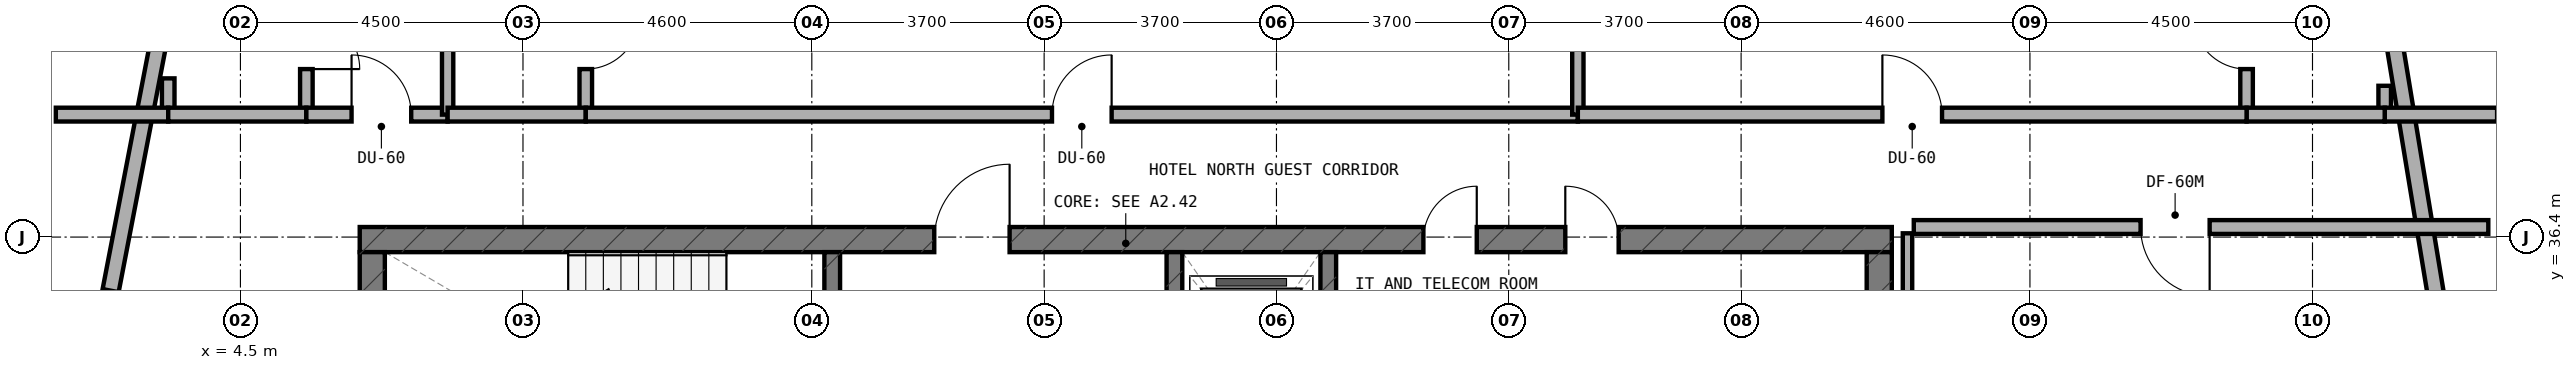
"""IFC4 building model, lengths in metres.
Left out: names, types, materials, properties, quantities, classifications, styles, units other than length and angle.
Written with IfcOpenShell. Run it as: python <this file> out.ifc"""

import sys

from ifc_helpers import new_model, si_unit, direction, frame, frame_2d, origin, place, context, subcontext, project, spatial, rectangle, extrude, element, fill, save


model = new_model("IFC4")
c1 = context("Model", 3, precision=1e-05, world=origin(), true_north=direction((0.0, 1.0)))
c2 = subcontext(c1, "Body", "Model", "MODEL_VIEW")
j1 = project(units=[si_unit("LENGTHUNIT", "METRE"), si_unit("PLANEANGLEUNIT", "RADIAN")], contexts=[c1])
p1 = place(None, origin())
s1 = spatial("IfcSite", under=j1, at=p1, CompositionType="ELEMENT")
p2 = place(p1, origin())
s2 = spatial("IfcBuilding", under=s1, at=p2, CompositionType="ELEMENT")
p3 = place(p2, frame((0.0, 0.0, 195.5)))
s3 = spatial("IfcBuildingStorey", under=s2, at=p3, CompositionType="ELEMENT", Elevation=195.5)
p4 = place(p3, frame((6.4, 36.36, 0.0), z_axis=(0.0, 0.0, 1.0), x_axis=(1.0, 0.0, 0.0)))
e1 = element("IfcWall", 1, at=p4, inside=s3, PredefinedType="SHEAR", context=c2, shape_type="SweptSolid", body=[
    extrude(rectangle(XDim=24.4, YDim=0.4, at=frame_2d((12.2, 0.0))), origin(), (0.0, 0.0, 1.0), 3.6),
])
p5 = place(p4, frame((9.15, 0.0, 0.0)))
e2 = element("IfcOpeningElement", 2, at=p5, cuts=e1, PredefinedType="OPENING", context=c2, shape_type="SweptSolid", body=[
    extrude(rectangle(XDim=1.2, YDim=2.15, at=frame_2d((0.6, 1.075))), frame((0.0, 0.21, 0.0), z_axis=(0.0, -1.0, 0.0), x_axis=(1.0, 0.0, 0.0)), (0.0, 0.0, 1.0), 0.42),
])
p6 = place(p4, frame((19.2, 0.0, 0.0)))
e3 = element("IfcOpeningElement", 3, at=p6, cuts=e1, PredefinedType="OPENING", context=c2, shape_type="SweptSolid", body=[
    extrude(rectangle(XDim=0.85, YDim=2.1, at=frame_2d((0.425, 1.05))), frame((0.0, 0.21, 0.0), z_axis=(0.0, -1.0, 0.0), x_axis=(1.0, 0.0, 0.0)), (0.0, 0.0, 1.0), 0.42),
])
p7 = place(p4, frame((16.94, 0.0, 0.0)))
e4 = element("IfcOpeningElement", 4, at=p7, cuts=e1, PredefinedType="OPENING", context=c2, shape_type="SweptSolid", body=[
    extrude(rectangle(XDim=0.85, YDim=2.1, at=frame_2d((0.425, 1.05))), frame((0.0, 0.21, 0.0), z_axis=(0.0, -1.0, 0.0), x_axis=(1.0, 0.0, 0.0)), (0.0, 0.0, 1.0), 0.42),
])
for number, where, z_axis, x_axis in (
    (5, (6.6, 33.0, 0.0), (0.0, 0.0, 1.0), (0.0, 1.0, 0.0)),
    (6, (30.6, 33.0, 0.0), (0.0, 0.0, 1.0), (0.0, 1.0, 0.0)),
):
    element("IfcWall", number, at=place(p3, frame(where, z_axis=z_axis, x_axis=x_axis)), inside=s3, PredefinedType="SHEAR", context=c2, shape_type="SweptSolid", body=[
        extrude(rectangle(XDim=3.16, YDim=0.4, at=frame_2d((1.58, 0.0))), origin(), (0.0, 0.0, 1.0), 3.6),
    ])
p8 = place(p3, frame((13.925, 33.0, 0.0), z_axis=(0.0, 0.0, 1.0), x_axis=(0.0, 1.0, 0.0)))
e7 = element("IfcWall", 7, at=p8, inside=s3, PredefinedType="STANDARD", context=c2, shape_type="SweptSolid", body=[
    extrude(rectangle(XDim=3.16, YDim=0.25, at=frame_2d((1.58, 0.0))), origin(), (0.0, 0.0, 1.0), 3.28),
])
p9 = place(p8, frame((0.98, 0.0, 0.0)))
e8 = element("IfcOpeningElement", 8, at=p9, cuts=e7, PredefinedType="OPENING", context=c2, shape_type="SweptSolid", body=[
    extrude(rectangle(XDim=1.1, YDim=2.15, at=frame_2d((0.55, 1.075))), frame((0.0, 0.135, 0.0), z_axis=(0.0, -1.0, 0.0), x_axis=(1.0, 0.0, 0.0)), (0.0, 0.0, 1.0), 0.27),
])
p10 = place(p3, frame((19.375, 33.0, 0.0), z_axis=(0.0, 0.0, 1.0), x_axis=(0.0, 1.0, 0.0)))
e9 = element("IfcWall", 9, at=p10, inside=s3, PredefinedType="STANDARD", context=c2, shape_type="SweptSolid", body=[
    extrude(rectangle(XDim=3.16, YDim=0.25, at=frame_2d((1.58, 0.0))), origin(), (0.0, 0.0, 1.0), 3.28),
])
p11 = place(p10, frame((0.98, 0.0, 0.0)))
e10 = element("IfcOpeningElement", 10, at=p11, cuts=e9, PredefinedType="OPENING", context=c2, shape_type="SweptSolid", body=[
    extrude(rectangle(XDim=1.1, YDim=2.15, at=frame_2d((0.55, 1.075))), frame((0.0, 0.135, 0.0), z_axis=(0.0, -1.0, 0.0), x_axis=(1.0, 0.0, 0.0)), (0.0, 0.0, 1.0), 0.27),
])
p12 = place(p3, frame((21.825, 33.0, 0.0), z_axis=(0.0, 0.0, 1.0), x_axis=(0.0, 1.0, 0.0)))
e11 = element("IfcWall", 11, at=p12, inside=s3, PredefinedType="STANDARD", context=c2, shape_type="SweptSolid", body=[
    extrude(rectangle(XDim=3.16, YDim=0.25, at=frame_2d((1.58, 0.0))), origin(), (0.0, 0.0, 1.0), 3.28),
])
p13 = place(p3, frame((40.476, 29.354, 0.0), z_axis=(0.0, 0.0, 1.0), x_axis=(-0.162811037825, 0.986657268742, 0.0)))
e12 = element("IfcWall", 12, at=p13, inside=s3, PredefinedType="STANDARD", context=c2, shape_type="SweptSolid", body=[
    extrude(rectangle(XDim=10.473, YDim=0.26, at=frame_2d((5.236, 0.0))), origin(), (0.0, 0.0, 1.0), 3.28),
])
p14 = place(p13, frame((2.545, 0.0, 0.85)))
e13 = element("IfcOpeningElement", 13, at=p14, cuts=e12, PredefinedType="OPENING", context=c2, shape_type="SweptSolid", body=[
    extrude(rectangle(XDim=2.1, YDim=1.5, at=frame_2d((1.05, 0.75))), frame((0.0, 0.14, 0.0), z_axis=(0.0, -1.0, 0.0), x_axis=(1.0, 0.0, 0.0)), (0.0, 0.0, 1.0), 0.28),
])
p15 = place(p3, frame((3.23, 39.683, 0.0), z_axis=(0.0, 0.0, 1.0), x_axis=(-0.189254809039, -0.98192801022, 0.0)))
e14 = element("IfcWall", 14, at=p15, inside=s3, PredefinedType="STANDARD", context=c2, shape_type="SweptSolid", body=[
    extrude(rectangle(XDim=9.046, YDim=0.26, at=frame_2d((4.523, 0.0))), origin(), (0.0, 0.0, 1.0), 3.28),
])
p16 = place(p15, frame((4.212, 0.0, 0.85)))
e15 = element("IfcOpeningElement", 15, at=p16, cuts=e14, PredefinedType="OPENING", context=c2, shape_type="SweptSolid", body=[
    extrude(rectangle(XDim=2.1, YDim=1.5, at=frame_2d((1.05, 0.75))), frame((0.0, 0.14, 0.0), z_axis=(0.0, -1.0, 0.0), x_axis=(1.0, 0.0, 0.0)), (0.0, 0.0, 1.0), 0.28),
])
p17 = place(p3, frame((5.55, 38.45, 0.0), z_axis=(0.0, 0.0, 1.0), x_axis=(0.0, 1.0, 0.0)))
e16 = element("IfcWall", 16, at=p17, inside=s3, PredefinedType="PLUMBINGWALL", context=c2, shape_type="SweptSolid", body=[
    extrude(rectangle(XDim=2.1, YDim=0.2, at=frame_2d((1.05, 0.0))), origin(), (0.0, 0.0, 1.0), 3.28),
])
p18 = place(p17, frame((0.625, 0.0, 0.0)))
e17 = element("IfcOpeningElement", 17, at=p18, cuts=e16, PredefinedType="OPENING", context=c2, shape_type="SweptSolid", body=[
    extrude(rectangle(XDim=0.85, YDim=2.1, at=frame_2d((0.425, 1.05))), frame((0.0, 0.11, 0.0), z_axis=(0.0, -1.0, 0.0), x_axis=(1.0, 0.0, 0.0)), (0.0, 0.0, 1.0), 0.22),
])
p19 = place(p3, frame((3.35, 38.35, 0.0), z_axis=(0.0, 0.0, 1.0), x_axis=(0.0, 1.0, 0.0)))
e18 = element("IfcWall", 18, at=p19, inside=s3, PredefinedType="PLUMBINGWALL", context=c2, shape_type="SweptSolid", body=[
    extrude(rectangle(XDim=0.577, YDim=0.2, at=frame_2d((0.289, 0.0))), origin(), (0.0, 0.0, 1.0), 3.28),
])
p20 = place(p3, frame((1.56, 38.35, 0.0), z_axis=(0.0, 0.0, 1.0), x_axis=(1.0, 0.0, 0.0)))
e19 = element("IfcWall", 19, at=p20, inside=s3, PredefinedType="SOLIDWALL", context=c2, shape_type="SweptSolid", body=[
    extrude(rectangle(XDim=1.79, YDim=0.22, at=frame_2d((0.895, 0.0))), origin(), (0.0, 0.0, 1.0), 3.28),
])
p21 = place(p3, frame((3.35, 38.35, 0.0), z_axis=(0.0, 0.0, 1.0), x_axis=(1.0, 0.0, 0.0)))
e20 = element("IfcWall", 20, at=p21, inside=s3, PredefinedType="SOLIDWALL", context=c2, shape_type="SweptSolid", body=[
    extrude(rectangle(XDim=2.2, YDim=0.22, at=frame_2d((1.1, 0.0))), origin(), (0.0, 0.0, 1.0), 3.28),
])
p22 = place(p3, frame((5.55, 38.35, 0.0), z_axis=(0.0, 0.0, 1.0), x_axis=(1.0, 0.0, 0.0)))
e21 = element("IfcWall", 21, at=p22, inside=s3, PredefinedType="SOLIDWALL", context=c2, shape_type="SweptSolid", body=[
    extrude(rectangle(XDim=2.25, YDim=0.22, at=frame_2d((1.125, 0.0))), origin(), (0.0, 0.0, 1.0), 2.955),
])
p23 = place(p22, frame((0.72, 0.0, 0.0)))
e22 = element("IfcOpeningElement", 22, at=p23, cuts=e21, PredefinedType="OPENING", context=c2, shape_type="SweptSolid", body=[
    extrude(rectangle(XDim=0.95, YDim=2.1, at=frame_2d((0.475, 1.05))), frame((0.0, 0.12, 0.0), z_axis=(0.0, -1.0, 0.0), x_axis=(1.0, 0.0, 0.0)), (0.0, 0.0, 1.0), 0.24),
])
p24 = place(p3, frame((7.8, 38.35, 0.0), z_axis=(0.0, 0.0, 1.0), x_axis=(0.0, 1.0, 0.0)))
e23 = element("IfcWall", 23, at=p24, inside=s3, PredefinedType="SOLIDWALL", context=c2, shape_type="SweptSolid", body=[
    extrude(rectangle(XDim=4.778, YDim=0.18, at=frame_2d((2.389, 0.0))), origin(), (0.0, 0.0, 1.0), 2.895),
])
p25 = place(p3, frame((10.0, 38.45, 0.0), z_axis=(0.0, 0.0, 1.0), x_axis=(0.0, 1.0, 0.0)))
e24 = element("IfcWall", 24, at=p25, inside=s3, PredefinedType="PLUMBINGWALL", context=c2, shape_type="SweptSolid", body=[
    extrude(rectangle(XDim=2.1, YDim=0.2, at=frame_2d((1.05, 0.0))), origin(), (0.0, 0.0, 1.0), 2.895),
])
p26 = place(p25, frame((0.625, 0.0, 0.0)))
e25 = element("IfcOpeningElement", 25, at=p26, cuts=e24, PredefinedType="OPENING", context=c2, shape_type="SweptSolid", body=[
    extrude(rectangle(XDim=0.85, YDim=2.1, at=frame_2d((0.425, 1.05))), frame((0.0, 0.11, 0.0), z_axis=(0.0, -1.0, 0.0), x_axis=(1.0, 0.0, 0.0)), (0.0, 0.0, 1.0), 0.22),
])
p27 = place(p3, frame((7.8, 38.35, 0.0), z_axis=(0.0, 0.0, 1.0), x_axis=(1.0, 0.0, 0.0)))
e26 = element("IfcWall", 26, at=p27, inside=s3, PredefinedType="SOLIDWALL", context=c2, shape_type="SweptSolid", body=[
    extrude(rectangle(XDim=2.2, YDim=0.22, at=frame_2d((1.1, 0.0))), origin(), (0.0, 0.0, 1.0), 2.955),
])
p28 = place(p3, frame((10.0, 38.35, 0.0), z_axis=(0.0, 0.0, 1.0), x_axis=(1.0, 0.0, 0.0)))
e27 = element("IfcWall", 27, at=p28, inside=s3, PredefinedType="SOLIDWALL", context=c2, shape_type="SweptSolid", body=[
    extrude(rectangle(XDim=15.8, YDim=0.22, at=frame_2d((7.9, 0.0))), origin(), (0.0, 0.0, 1.0), 2.955),
])
p29 = place(p28, frame((7.425, 0.0, 0.0)))
e28 = element("IfcOpeningElement", 28, at=p29, cuts=e27, PredefinedType="OPENING", context=c2, shape_type="SweptSolid", body=[
    extrude(rectangle(XDim=0.95, YDim=2.1, at=frame_2d((0.475, 1.05))), frame((0.0, 0.12, 0.0), z_axis=(0.0, -1.0, 0.0), x_axis=(1.0, 0.0, 0.0)), (0.0, 0.0, 1.0), 0.24),
])
p30 = place(p3, frame((25.8, 38.35, 0.0), z_axis=(0.0, 0.0, 1.0), x_axis=(0.0, 1.0, 0.0)))
e29 = element("IfcWall", 29, at=p30, inside=s3, PredefinedType="SOLIDWALL", context=c2, shape_type="SweptSolid", body=[
    extrude(rectangle(XDim=6.19, YDim=0.18, at=frame_2d((3.095, 0.0))), origin(), (0.0, 0.0, 1.0), 2.895),
])
p31 = place(p3, frame((36.45, 38.45, 0.0), z_axis=(0.0, 0.0, 1.0), x_axis=(0.0, 1.0, 0.0)))
e30 = element("IfcWall", 30, at=p31, inside=s3, PredefinedType="PLUMBINGWALL", context=c2, shape_type="SweptSolid", body=[
    extrude(rectangle(XDim=2.1, YDim=0.2, at=frame_2d((1.05, 0.0))), origin(), (0.0, 0.0, 1.0), 3.28),
])
p32 = place(p31, frame((0.625, 0.0, 0.0)))
e31 = element("IfcOpeningElement", 31, at=p32, cuts=e30, PredefinedType="OPENING", context=c2, shape_type="SweptSolid", body=[
    extrude(rectangle(XDim=0.85, YDim=2.1, at=frame_2d((0.425, 1.05))), frame((0.0, 0.11, 0.0), z_axis=(0.0, -1.0, 0.0), x_axis=(1.0, 0.0, 0.0)), (0.0, 0.0, 1.0), 0.22),
])
p33 = place(p3, frame((38.65, 38.35, 0.0), z_axis=(0.0, 0.0, 1.0), x_axis=(0.0, 1.0, 0.0)))
e32 = element("IfcWall", 32, at=p33, inside=s3, PredefinedType="PLUMBINGWALL", context=c2, shape_type="SweptSolid", body=[
    extrude(rectangle(XDim=0.459, YDim=0.2, at=frame_2d((0.229, 0.0))), origin(), (0.0, 0.0, 1.0), 3.28),
])
p34 = place(p3, frame((38.65, 38.35, 0.0), z_axis=(0.0, 0.0, 1.0), x_axis=(1.0, 0.0, 0.0)))
e33 = element("IfcWall", 33, at=p34, inside=s3, PredefinedType="SOLIDWALL", context=c2, shape_type="SweptSolid", body=[
    extrude(rectangle(XDim=1.79, YDim=0.22, at=frame_2d((0.895, 0.0))), origin(), (0.0, 0.0, 1.0), 3.28),
])
p35 = place(p3, frame((36.45, 38.35, 0.0), z_axis=(0.0, 0.0, 1.0), x_axis=(1.0, 0.0, 0.0)))
e34 = element("IfcWall", 34, at=p35, inside=s3, PredefinedType="SOLIDWALL", context=c2, shape_type="SweptSolid", body=[
    extrude(rectangle(XDim=2.2, YDim=0.22, at=frame_2d((1.1, 0.0))), origin(), (0.0, 0.0, 1.0), 3.28),
])
p36 = place(p3, frame((25.8, 38.35, 0.0), z_axis=(0.0, 0.0, 1.0), x_axis=(1.0, 0.0, 0.0)))
e35 = element("IfcWall", 35, at=p36, inside=s3, PredefinedType="SOLIDWALL", context=c2, shape_type="SweptSolid", body=[
    extrude(rectangle(XDim=10.65, YDim=0.22, at=frame_2d((5.325, 0.0))), origin(), (0.0, 0.0, 1.0), 2.895),
])
p37 = place(p36, frame((4.85, 0.0, 0.0)))
e36 = element("IfcOpeningElement", 36, at=p37, cuts=e35, PredefinedType="OPENING", context=c2, shape_type="SweptSolid", body=[
    extrude(rectangle(XDim=0.95, YDim=2.1, at=frame_2d((0.475, 1.05))), frame((0.0, 0.12, 0.0), z_axis=(0.0, -1.0, 0.0), x_axis=(1.0, 0.0, 0.0)), (0.0, 0.0, 1.0), 0.24),
])
p38 = place(p3, frame((31.05, 29.8, 0.0), z_axis=(0.0, 0.0, 1.0), x_axis=(0.0, 1.0, 0.0)))
e37 = element("IfcWall", 37, at=p38, inside=s3, PredefinedType="PARTITIONING", context=c2, shape_type="SweptSolid", body=[
    extrude(rectangle(XDim=6.66, YDim=0.15, at=frame_2d((3.33, 0.0))), origin(), (0.0, 0.0, 1.0), 2.955),
])
p39 = place(p3, frame((31.15, 36.56, 0.0), z_axis=(0.0, 0.0, 1.0), x_axis=(1.0, 0.0, 0.0)))
e38 = element("IfcWall", 38, at=p39, inside=s3, PredefinedType="SOLIDWALL", context=c2, shape_type="SweptSolid", body=[
    extrude(rectangle(XDim=9.15, YDim=0.22, at=frame_2d((4.575, 0.0))), origin(), (0.0, 0.0, 1.0), 2.895),
])
p40 = place(p39, frame((3.612, 0.0, 0.0)))
e39 = element("IfcOpeningElement", 39, at=p40, cuts=e38, PredefinedType="OPENING", context=c2, shape_type="SweptSolid", body=[
    extrude(rectangle(XDim=1.1, YDim=2.1, at=frame_2d((0.55, 1.05))), frame((0.0, 0.12, 0.0), z_axis=(0.0, -1.0, 0.0), x_axis=(1.0, 0.0, 0.0)), (0.0, 0.0, 1.0), 0.24),
])
p41 = place(p5, origin())
e40 = element("IfcDoor", 40, at=p41, inside=s3, OperationType="SINGLE_SWING_RIGHT", PredefinedType="DOOR", context=c2, shape_type="SweptSolid", body=[
    extrude(rectangle(XDim=1.2, YDim=2.15, at=frame_2d((0.6, 1.075))), frame((0.0, 0.025, 0.0), z_axis=(0.0, -1.0, 0.0), x_axis=(1.0, 0.0, 0.0)), (0.0, 0.0, 1.0), 0.05),
])
fill(e2, e40)
p42 = place(p6, origin())
e41 = element("IfcDoor", 41, at=p42, inside=s3, OperationType="SINGLE_SWING_LEFT", PredefinedType="DOOR", context=c2, shape_type="SweptSolid", body=[
    extrude(rectangle(XDim=0.85, YDim=2.1, at=frame_2d((0.425, 1.05))), frame((0.0, 0.025, 0.0), z_axis=(0.0, -1.0, 0.0), x_axis=(1.0, 0.0, 0.0)), (0.0, 0.0, 1.0), 0.05),
])
fill(e3, e41)
p43 = place(p7, origin())
e42 = element("IfcDoor", 42, at=p43, inside=s3, OperationType="SINGLE_SWING_RIGHT", PredefinedType="DOOR", context=c2, shape_type="SweptSolid", body=[
    extrude(rectangle(XDim=0.85, YDim=2.1, at=frame_2d((0.425, 1.05))), frame((0.0, 0.025, 0.0), z_axis=(0.0, -1.0, 0.0), x_axis=(1.0, 0.0, 0.0)), (0.0, 0.0, 1.0), 0.05),
])
fill(e4, e42)
p44 = place(p18, frame((0.85, 0.0, 0.0), z_axis=(0.0, 0.0, 1.0), x_axis=(-1.0, 0.0, 0.0)))
e43 = element("IfcDoor", 43, at=p44, inside=s3, OperationType="SINGLE_SWING_RIGHT", PredefinedType="DOOR", context=c2, shape_type="SweptSolid", body=[
    extrude(rectangle(XDim=0.85, YDim=2.1, at=frame_2d((0.425, 1.05))), frame((0.0, 0.025, 0.0), z_axis=(0.0, -1.0, 0.0), x_axis=(1.0, 0.0, 0.0)), (0.0, 0.0, 1.0), 0.05),
])
fill(e17, e43)
p45 = place(p23, origin())
e44 = element("IfcDoor", 44, at=p45, inside=s3, OperationType="SINGLE_SWING_LEFT", PredefinedType="DOOR", context=c2, shape_type="SweptSolid", body=[
    extrude(rectangle(XDim=0.95, YDim=2.1, at=frame_2d((0.475, 1.05))), frame((0.0, 0.025, 0.0), z_axis=(0.0, -1.0, 0.0), x_axis=(1.0, 0.0, 0.0)), (0.0, 0.0, 1.0), 0.05),
])
fill(e22, e44)
p46 = place(p26, frame((0.85, 0.0, 0.0), z_axis=(0.0, 0.0, 1.0), x_axis=(-1.0, 0.0, 0.0)))
e45 = element("IfcDoor", 45, at=p46, inside=s3, OperationType="SINGLE_SWING_LEFT", PredefinedType="DOOR", context=c2, shape_type="SweptSolid", body=[
    extrude(rectangle(XDim=0.85, YDim=2.1, at=frame_2d((0.425, 1.05))), frame((0.0, 0.025, 0.0), z_axis=(0.0, -1.0, 0.0), x_axis=(1.0, 0.0, 0.0)), (0.0, 0.0, 1.0), 0.05),
])
fill(e25, e45)
p47 = place(p29, origin())
e46 = element("IfcDoor", 46, at=p47, inside=s3, OperationType="SINGLE_SWING_RIGHT", PredefinedType="DOOR", context=c2, shape_type="SweptSolid", body=[
    extrude(rectangle(XDim=0.95, YDim=2.1, at=frame_2d((0.475, 1.05))), frame((0.0, 0.025, 0.0), z_axis=(0.0, -1.0, 0.0), x_axis=(1.0, 0.0, 0.0)), (0.0, 0.0, 1.0), 0.05),
])
fill(e28, e46)
p48 = place(p32, origin())
e47 = element("IfcDoor", 47, at=p48, inside=s3, OperationType="SINGLE_SWING_RIGHT", PredefinedType="DOOR", context=c2, shape_type="SweptSolid", body=[
    extrude(rectangle(XDim=0.85, YDim=2.1, at=frame_2d((0.425, 1.05))), frame((0.0, 0.025, 0.0), z_axis=(0.0, -1.0, 0.0), x_axis=(1.0, 0.0, 0.0)), (0.0, 0.0, 1.0), 0.05),
])
fill(e31, e47)
p49 = place(p37, origin())
e48 = element("IfcDoor", 48, at=p49, inside=s3, OperationType="SINGLE_SWING_LEFT", PredefinedType="DOOR", context=c2, shape_type="SweptSolid", body=[
    extrude(rectangle(XDim=0.95, YDim=2.1, at=frame_2d((0.475, 1.05))), frame((0.0, 0.025, 0.0), z_axis=(0.0, -1.0, 0.0), x_axis=(1.0, 0.0, 0.0)), (0.0, 0.0, 1.0), 0.05),
])
fill(e36, e48)
p50 = place(p40, frame((1.1, 0.0, 0.0), z_axis=(0.0, 0.0, 1.0), x_axis=(-1.0, 0.0, 0.0)))
e49 = element("IfcDoor", 49, at=p50, inside=s3, OperationType="SINGLE_SWING_LEFT", PredefinedType="DOOR", context=c2, shape_type="SweptSolid", body=[
    extrude(rectangle(XDim=1.1, YDim=2.1, at=frame_2d((0.55, 1.05))), frame((0.0, 0.025, 0.0), z_axis=(0.0, -1.0, 0.0), x_axis=(1.0, 0.0, 0.0)), (0.0, 0.0, 1.0), 0.05),
])
fill(e39, e49)
save(model, sys.argv[1])
